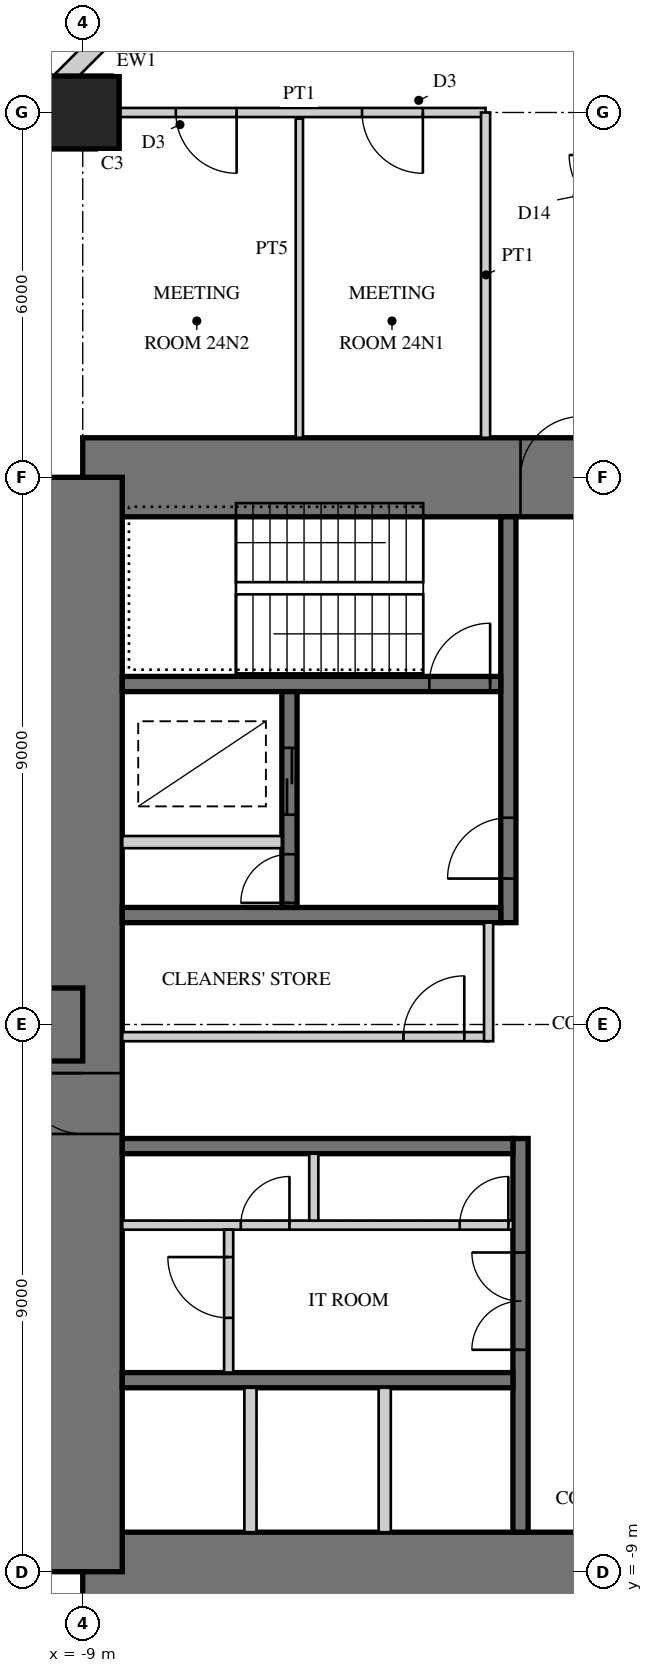
"""IFC4 building model, lengths in metres.
Left out: names, types, materials, properties, quantities, classifications, styles, units other than length and angle.
Written with IfcOpenShell. Run it as: python <this file> out.ifc"""

import sys

from ifc_helpers import new_model, si_unit, direction, frame, frame_2d, origin, origin_2d, place, context, subcontext, project, spatial, rectangle, extrude, element, fill, save


model = new_model("IFC4")
c1 = context("Model", 3, precision=1e-05, world=origin(), true_north=direction((0.0, 1.0)))
c2 = subcontext(c1, "Body", "Model", "MODEL_VIEW")
j1 = project(units=[si_unit("LENGTHUNIT", "METRE"), si_unit("PLANEANGLEUNIT", "RADIAN")], contexts=[c1])
p1 = place(None, origin())
s1 = spatial("IfcSite", under=j1, at=p1, CompositionType="ELEMENT")
p2 = place(p1, origin())
s2 = spatial("IfcBuilding", under=s1, at=p2, CompositionType="ELEMENT")
p3 = place(p2, frame((0.0, 0.0, 100.5)))
s3 = spatial("IfcBuildingStorey", under=s2, at=p3, CompositionType="ELEMENT", Elevation=100.5)
p4 = place(p3, frame((9.0, 9.0, 0.0), z_axis=(0.0, 0.0, 1.0), x_axis=(-1.0, 0.0, 0.0)))
e1 = element("IfcWall", 1, at=p4, inside=s3, PredefinedType="SHEAR", context=c2, shape_type="SweptSolid", body=[
    extrude(rectangle(XDim=18.0, YDim=1.3, at=frame_2d((9.0, 0.0))), origin(), (0.0, 0.0, 1.0), 4.0),
])
p5 = place(p4, frame((9.8, 0.0, 0.0)))
e2 = element("IfcOpeningElement", 2, at=p5, cuts=e1, PredefinedType="OPENING", context=c2, shape_type="SweptSolid", body=[
    extrude(rectangle(XDim=1.0, YDim=2.4, at=frame_2d((0.5, 1.2))), frame((0.0, 0.66, 0.0), z_axis=(0.0, -1.0, 0.0), x_axis=(1.0, 0.0, 0.0)), (0.0, 0.0, 1.0), 1.32),
])
p6 = place(p3, frame((-9.0, -9.0, 0.0), z_axis=(0.0, 0.0, 1.0), x_axis=(1.0, 0.0, 0.0)))
e3 = element("IfcWall", 3, at=p6, inside=s3, PredefinedType="SHEAR", context=c2, shape_type="SweptSolid", body=[
    extrude(rectangle(XDim=18.0, YDim=1.3, at=frame_2d((9.0, 0.0))), origin(), (0.0, 0.0, 1.0), 4.0),
])
p7 = place(p6, frame((9.8, 0.0, 0.0)))
e4 = element("IfcOpeningElement", 4, at=p7, cuts=e3, PredefinedType="OPENING", context=c2, shape_type="SweptSolid", body=[
    extrude(rectangle(XDim=1.0, YDim=2.4, at=frame_2d((0.5, 1.2))), frame((0.0, 0.66, 0.0), z_axis=(0.0, -1.0, 0.0), x_axis=(1.0, 0.0, 0.0)), (0.0, 0.0, 1.0), 1.32),
])
p8 = place(p3, frame((-9.0, 9.0, 0.0), z_axis=(0.0, 0.0, 1.0), x_axis=(0.0, -1.0, 0.0)))
e5 = element("IfcWall", 5, at=p8, inside=s3, PredefinedType="SHEAR", context=c2, shape_type="SweptSolid", body=[
    extrude(rectangle(XDim=18.0, YDim=1.3, at=frame_2d((9.0, 0.0))), origin(), (0.0, 0.0, 1.0), 4.0),
])
p9 = place(p8, frame((9.8, 0.0, 0.0)))
e6 = element("IfcOpeningElement", 6, at=p9, cuts=e5, PredefinedType="OPENING", context=c2, shape_type="SweptSolid", body=[
    extrude(rectangle(XDim=1.0, YDim=2.4, at=frame_2d((0.5, 1.2))), frame((0.0, 0.66, 0.0), z_axis=(0.0, -1.0, 0.0), x_axis=(1.0, 0.0, 0.0)), (0.0, 0.0, 1.0), 1.32),
])
p10 = place(p3, frame((-2.0, 1.675, 0.0), z_axis=(0.0, 0.0, 1.0), x_axis=(0.0, 1.0, 0.0)))
e7 = element("IfcWall", 7, at=p10, inside=s3, PredefinedType="SHEAR", context=c2, shape_type="SweptSolid", body=[
    extrude(rectangle(XDim=6.675, YDim=0.25, at=frame_2d((3.337, 0.0))), origin(), (0.0, 0.0, 1.0), 4.0),
])
p11 = place(p10, frame((0.725, 0.0, 0.0)))
e8 = element("IfcOpeningElement", 8, at=p11, cuts=e7, PredefinedType="OPENING", context=c2, shape_type="SweptSolid", body=[
    extrude(rectangle(XDim=1.0, YDim=2.1, at=frame_2d((0.5, 1.05))), frame((0.0, 0.135, 0.0), z_axis=(0.0, -1.0, 0.0), x_axis=(1.0, 0.0, 0.0)), (0.0, 0.0, 1.0), 0.27),
])
p12 = place(p3, frame((-2.125, 1.8, 0.0), z_axis=(0.0, 0.0, 1.0), x_axis=(-1.0, 0.0, 0.0)))
e9 = element("IfcWall", 9, at=p12, inside=s3, PredefinedType="SHEAR", context=c2, shape_type="SweptSolid", body=[
    extrude(rectangle(XDim=6.225, YDim=0.25, at=frame_2d((3.113, 0.0))), origin(), (0.0, 0.0, 1.0), 4.0),
])
p13 = place(p3, frame((-2.125, 5.6, 0.0), z_axis=(0.0, 0.0, 1.0), x_axis=(-1.0, 0.0, 0.0)))
e10 = element("IfcWall", 10, at=p13, inside=s3, PredefinedType="SHEAR", context=c2, shape_type="SweptSolid", body=[
    extrude(rectangle(XDim=6.225, YDim=0.25, at=frame_2d((3.113, 0.0))), origin(), (0.0, 0.0, 1.0), 4.0),
])
p14 = place(p13, frame((0.175, 0.0, 0.0)))
e11 = element("IfcOpeningElement", 11, at=p14, cuts=e10, PredefinedType="OPENING", context=c2, shape_type="SweptSolid", body=[
    extrude(rectangle(XDim=1.0, YDim=2.1, at=frame_2d((0.5, 1.05))), frame((0.0, 0.135, 0.0), z_axis=(0.0, -1.0, 0.0), x_axis=(1.0, 0.0, 0.0)), (0.0, 0.0, 1.0), 0.27),
])
p15 = place(p3, frame((-5.6, 1.925, 0.0), z_axis=(0.0, 0.0, 1.0), x_axis=(0.0, 1.0, 0.0)))
e12 = element("IfcWall", 12, at=p15, inside=s3, PredefinedType="SHEAR", context=c2, shape_type="SweptSolid", body=[
    extrude(rectangle(XDim=3.55, YDim=0.25, at=frame_2d((1.775, 0.0))), origin(), (0.0, 0.0, 1.0), 4.0),
])
p16 = place(p15, frame((1.525, 0.0, 0.0)))
e13 = element("IfcOpeningElement", 13, at=p16, cuts=e12, PredefinedType="OPENING", context=c2, shape_type="SweptSolid", body=[
    extrude(rectangle(XDim=1.1, YDim=2.2, at=frame_2d((0.55, 1.1))), frame((0.0, 0.135, 0.0), z_axis=(0.0, -1.0, 0.0), x_axis=(1.0, 0.0, 0.0)), (0.0, 0.0, 1.0), 0.27),
])
p17 = place(p15, frame((0.075, 0.0, 0.0)))
e14 = element("IfcOpeningElement", 14, at=p17, cuts=e12, PredefinedType="OPENING", context=c2, shape_type="SweptSolid", body=[
    extrude(rectangle(XDim=0.8, YDim=2.1, at=frame_2d((0.4, 1.05))), frame((0.0, 0.135, 0.0), z_axis=(0.0, -1.0, 0.0), x_axis=(1.0, 0.0, 0.0)), (0.0, 0.0, 1.0), 0.27),
])
p18 = place(p3, frame((-5.725, 3.0, 0.0), z_axis=(0.0, 0.0, 1.0), x_axis=(-1.0, 0.0, 0.0)))
e15 = element("IfcWall", 15, at=p18, inside=s3, PredefinedType="PARTITIONING", context=c2, shape_type="SweptSolid", body=[
    extrude(rectangle(XDim=2.625, YDim=0.2, at=frame_2d((1.312, 0.0))), origin(), (0.0, 0.0, 1.0), 4.0),
])
p19 = place(p3, frame((-1.8, -1.875, 0.0), z_axis=(0.0, 0.0, 1.0), x_axis=(0.0, -1.0, 0.0)))
e16 = element("IfcWall", 16, at=p19, inside=s3, PredefinedType="SHEAR", context=c2, shape_type="SweptSolid", body=[
    extrude(rectangle(XDim=6.475, YDim=0.25, at=frame_2d((3.238, 0.0))), origin(), (0.0, 0.0, 1.0), 4.0),
])
p20 = place(p19, frame((1.875, 0.0, 0.0)))
e17 = element("IfcOpeningElement", 17, at=p20, cuts=e16, PredefinedType="OPENING", context=c2, shape_type="SweptSolid", body=[
    extrude(rectangle(XDim=1.6, YDim=2.4, at=frame_2d((0.8, 1.2))), frame((0.0, 0.135, 0.0), z_axis=(0.0, -1.0, 0.0), x_axis=(1.0, 0.0, 0.0)), (0.0, 0.0, 1.0), 0.27),
])
for number, where, z_axis, x_axis in (
    (18, (-1.925, -2.0, 0.0), (0.0, 0.0, 1.0), (-1.0, 0.0, 0.0)),
    (19, (-1.925, -5.85, 0.0), (0.0, 0.0, 1.0), (-1.0, 0.0, 0.0)),
):
    element("IfcWall", number, at=place(p3, frame(where, z_axis=z_axis, x_axis=x_axis)), inside=s3, PredefinedType="SHEAR", context=c2, shape_type="SweptSolid", body=[
        extrude(rectangle(XDim=6.425, YDim=0.25, at=frame_2d((3.212, 0.0))), origin(), (0.0, 0.0, 1.0), 4.0),
    ])
p21 = place(p3, frame((-1.925, -3.3, 0.0), z_axis=(0.0, 0.0, 1.0), x_axis=(-1.0, 0.0, 0.0)))
e20 = element("IfcWall", 20, at=p21, inside=s3, PredefinedType="PARTITIONING", context=c2, shape_type="SweptSolid", body=[
    extrude(rectangle(XDim=6.425, YDim=0.15, at=frame_2d((3.212, 0.0))), origin(), (0.0, 0.0, 1.0), 4.0),
])
p22 = place(p21, frame((0.075, 0.0, 0.0)))
e21 = element("IfcOpeningElement", 21, at=p22, cuts=e20, PredefinedType="OPENING", context=c2, shape_type="SweptSolid", body=[
    extrude(rectangle(XDim=0.8, YDim=2.1, at=frame_2d((0.4, 1.05))), frame((0.0, 0.085, 0.0), z_axis=(0.0, -1.0, 0.0), x_axis=(1.0, 0.0, 0.0)), (0.0, 0.0, 1.0), 0.17),
])
p23 = place(p21, frame((3.675, 0.0, 0.0)))
e22 = element("IfcOpeningElement", 22, at=p23, cuts=e20, PredefinedType="OPENING", context=c2, shape_type="SweptSolid", body=[
    extrude(rectangle(XDim=0.8, YDim=2.1, at=frame_2d((0.4, 1.05))), frame((0.0, 0.085, 0.0), z_axis=(0.0, -1.0, 0.0), x_axis=(1.0, 0.0, 0.0)), (0.0, 0.0, 1.0), 0.17),
])
p24 = place(p3, frame((-5.2, -2.125, 0.0), z_axis=(0.0, 0.0, 1.0), x_axis=(0.0, -1.0, 0.0)))
e23 = element("IfcWall", 23, at=p24, inside=s3, PredefinedType="PARTITIONING", context=c2, shape_type="SweptSolid", body=[
    extrude(rectangle(XDim=1.1, YDim=0.15, at=frame_2d((0.55, 0.0))), origin(), (0.0, 0.0, 1.0), 4.0),
])
for number, where, z_axis, x_axis in (
    (24, (-4.033, -5.975, 0.0), (0.0, 0.0, 1.0), (0.0, -1.0, 0.0)),
    (25, (-6.242, -5.975, 0.0), (0.0, 0.0, 1.0), (0.0, -1.0, 0.0)),
):
    element("IfcWall", number, at=place(p3, frame(where, z_axis=z_axis, x_axis=x_axis)), inside=s3, PredefinedType="PARTITIONING", context=c2, shape_type="SweptSolid", body=[
        extrude(rectangle(XDim=2.375, YDim=0.2, at=frame_2d((1.188, 0.0))), origin(), (0.0, 0.0, 1.0), 4.0),
    ])
p25 = place(p3, frame((-9.0, 0.0, 0.0), z_axis=(0.0, 0.0, 1.0), x_axis=(-1.0, 0.0, 0.0)))
e26 = element("IfcWall", 26, at=p25, inside=s3, PredefinedType="SHEAR", context=c2, shape_type="SweptSolid", body=[
    extrude(rectangle(XDim=18.0, YDim=1.2, at=frame_2d((9.0, 0.0))), origin(), (0.0, 0.0, 1.0), 4.0),
])
p26 = place(p25, frame((9.8, 0.0, 0.0)))
e27 = element("IfcOpeningElement", 27, at=p26, cuts=e26, PredefinedType="OPENING", context=c2, shape_type="SweptSolid", body=[
    extrude(rectangle(XDim=1.0, YDim=2.2, at=frame_2d((0.5, 1.1))), frame((0.0, 0.61, 0.0), z_axis=(0.0, -1.0, 0.0), x_axis=(1.0, 0.0, 0.0)), (0.0, 0.0, 1.0), 1.22),
])
p27 = place(p3, frame((-9.0, 15.0, 0.0), z_axis=(0.0, 0.0, 1.0), x_axis=(1.0, 0.0, 0.0)))
e28 = element("IfcColumn", 28, at=p27, inside=s3, PredefinedType="COLUMN", context=c2, shape_type="SweptSolid", body=[
    extrude(rectangle(XDim=1.2, YDim=1.2, at=origin_2d()), origin(), (0.0, 0.0, 1.0), 4.0),
])
p28 = place(p3, frame((-6.277, 18.6, 0.0), z_axis=(0.0, 0.0, 1.0), x_axis=(-0.707106781187, -0.707106781187, 0.0)))
e29 = element("IfcWall", 29, at=p28, inside=s3, PredefinedType="SOLIDWALL", context=c2, shape_type="SweptSolid", body=[
    extrude(rectangle(XDim=4.728, YDim=0.3, at=frame_2d((2.364, 0.0))), origin(), (0.0, 0.0, 1.0), 3.8),
])
p29 = place(p28, frame((1.65, 0.0, 0.0)))
e30 = element("IfcOpeningElement", 30, at=p29, cuts=e29, PredefinedType="OPENING", context=c2, shape_type="SweptSolid", body=[
    extrude(rectangle(XDim=1.0, YDim=2.4, at=frame_2d((0.5, 1.2))), frame((0.0, 0.16, 0.0), z_axis=(0.0, -1.0, 0.0), x_axis=(1.0, 0.0, 0.0)), (0.0, 0.0, 1.0), 0.32),
])
p30 = place(p3, frame((-2.325, -0.2, 0.0), z_axis=(0.0, 0.0, 1.0), x_axis=(-1.0, 0.0, 0.0)))
e31 = element("IfcWall", 31, at=p30, inside=s3, PredefinedType="PARTITIONING", context=c2, shape_type="SweptSolid", body=[
    extrude(rectangle(XDim=6.025, YDim=0.15, at=frame_2d((3.013, 0.0))), origin(), (0.0, 0.0, 1.0), 3.8),
])
p31 = place(p30, frame((0.4, 0.0, 0.0)))
e32 = element("IfcOpeningElement", 32, at=p31, cuts=e31, PredefinedType="OPENING", context=c2, shape_type="SweptSolid", body=[
    extrude(rectangle(XDim=1.0, YDim=2.1, at=frame_2d((0.5, 1.05))), frame((0.0, 0.085, 0.0), z_axis=(0.0, -1.0, 0.0), x_axis=(1.0, 0.0, 0.0)), (0.0, 0.0, 1.0), 0.17),
])
p32 = place(p3, frame((-2.325, 1.675, 0.0), z_axis=(0.0, 0.0, 1.0), x_axis=(0.0, -1.0, 0.0)))
e33 = element("IfcWall", 33, at=p32, inside=s3, PredefinedType="PARTITIONING", context=c2, shape_type="SweptSolid", body=[
    extrude(rectangle(XDim=1.95, YDim=0.15, at=frame_2d((0.975, 0.0))), origin(), (0.0, 0.0, 1.0), 3.8),
])
p33 = place(p3, frame((-6.6, -3.375, 0.0), z_axis=(0.0, 0.0, 1.0), x_axis=(0.0, -1.0, 0.0)))
e34 = element("IfcWall", 34, at=p33, inside=s3, PredefinedType="PARTITIONING", context=c2, shape_type="SweptSolid", body=[
    extrude(rectangle(XDim=2.35, YDim=0.15, at=frame_2d((1.175, 0.0))), origin(), (0.0, 0.0, 1.0), 3.8),
])
p34 = place(p33, frame((0.45, 0.0, 0.0)))
e35 = element("IfcOpeningElement", 35, at=p34, cuts=e34, PredefinedType="OPENING", context=c2, shape_type="SweptSolid", body=[
    extrude(rectangle(XDim=1.0, YDim=2.1, at=frame_2d((0.5, 1.05))), frame((0.0, 0.085, 0.0), z_axis=(0.0, -1.0, 0.0), x_axis=(1.0, 0.0, 0.0)), (0.0, 0.0, 1.0), 0.17),
])
p35 = place(p3, frame((-2.375, 15.0, 0.0), z_axis=(0.0, 0.0, 1.0), x_axis=(-1.0, 0.0, 0.0)))
e36 = element("IfcWall", 36, at=p35, inside=s3, PredefinedType="PARTITIONING", context=c2, shape_type="SweptSolid", body=[
    extrude(rectangle(XDim=6.125, YDim=0.15, at=frame_2d((3.062, 0.0))), origin(), (0.0, 0.0, 1.0), 3.0),
])
p36 = place(p35, frame((1.031, 0.0, 0.0)))
e37 = element("IfcOpeningElement", 37, at=p36, cuts=e36, PredefinedType="OPENING", context=c2, shape_type="SweptSolid", body=[
    extrude(rectangle(XDim=1.0, YDim=2.1, at=frame_2d((0.5, 1.05))), frame((0.0, 0.085, 0.0), z_axis=(0.0, -1.0, 0.0), x_axis=(1.0, 0.0, 0.0)), (0.0, 0.0, 1.0), 0.17),
])
p37 = place(p35, frame((4.094, 0.0, 0.0)))
e38 = element("IfcOpeningElement", 38, at=p37, cuts=e36, PredefinedType="OPENING", context=c2, shape_type="SweptSolid", body=[
    extrude(rectangle(XDim=1.0, YDim=2.1, at=frame_2d((0.5, 1.05))), frame((0.0, 0.085, 0.0), z_axis=(0.0, -1.0, 0.0), x_axis=(1.0, 0.0, 0.0)), (0.0, 0.0, 1.0), 0.17),
])
p38 = place(p3, frame((-2.375, 9.65, 0.0), z_axis=(0.0, 0.0, 1.0), x_axis=(0.0, 1.0, 0.0)))
e39 = element("IfcWall", 39, at=p38, inside=s3, PredefinedType="PARTITIONING", context=c2, shape_type="SweptSolid", body=[
    extrude(rectangle(XDim=5.35, YDim=0.15, at=frame_2d((2.675, 0.0))), origin(), (0.0, 0.0, 1.0), 3.8),
])
p39 = place(p3, frame((-5.438, 9.65, 0.0), z_axis=(0.0, 0.0, 1.0), x_axis=(0.0, 1.0, 0.0)))
e40 = element("IfcWall", 40, at=p39, inside=s3, PredefinedType="PLUMBINGWALL", context=c2, shape_type="SweptSolid", body=[
    extrude(rectangle(XDim=5.25, YDim=0.12, at=frame_2d((2.625, 0.0))), origin(), (0.0, 0.0, 1.0), 3.8),
])
p40 = place(p31, frame((1.0, 0.0, 0.0), z_axis=(0.0, 0.0, 1.0), x_axis=(-1.0, 0.0, 0.0)))
e41 = element("IfcDoor", 41, at=p40, inside=s3, OperationType="SINGLE_SWING_RIGHT", PredefinedType="DOOR", context=c2, shape_type="SweptSolid", body=[
    extrude(rectangle(XDim=1.0, YDim=2.1, at=frame_2d((0.5, 1.05))), frame((0.0, 0.025, 0.0), z_axis=(0.0, -1.0, 0.0), x_axis=(1.0, 0.0, 0.0)), (0.0, 0.0, 1.0), 0.05),
])
fill(e32, e41)
p41 = place(p34, frame((1.0, 0.0, 0.0), z_axis=(0.0, 0.0, 1.0), x_axis=(-1.0, 0.0, 0.0)))
e42 = element("IfcDoor", 42, at=p41, inside=s3, OperationType="SINGLE_SWING_RIGHT", PredefinedType="DOOR", context=c2, shape_type="SweptSolid", body=[
    extrude(rectangle(XDim=1.0, YDim=2.1, at=frame_2d((0.5, 1.05))), frame((0.0, 0.025, 0.0), z_axis=(0.0, -1.0, 0.0), x_axis=(1.0, 0.0, 0.0)), (0.0, 0.0, 1.0), 0.05),
])
fill(e35, e42)
p42 = place(p36, origin())
e43 = element("IfcDoor", 43, at=p42, inside=s3, OperationType="SINGLE_SWING_LEFT", PredefinedType="DOOR", context=c2, shape_type="SweptSolid", body=[
    extrude(rectangle(XDim=1.0, YDim=2.1, at=frame_2d((0.5, 1.05))), frame((0.0, 0.025, 0.0), z_axis=(0.0, -1.0, 0.0), x_axis=(1.0, 0.0, 0.0)), (0.0, 0.0, 1.0), 0.05),
])
fill(e37, e43)
p43 = place(p37, origin())
e44 = element("IfcDoor", 44, at=p43, inside=s3, OperationType="SINGLE_SWING_LEFT", PredefinedType="DOOR", context=c2, shape_type="SweptSolid", body=[
    extrude(rectangle(XDim=1.0, YDim=2.1, at=frame_2d((0.5, 1.05))), frame((0.0, 0.025, 0.0), z_axis=(0.0, -1.0, 0.0), x_axis=(1.0, 0.0, 0.0)), (0.0, 0.0, 1.0), 0.05),
])
fill(e38, e44)
p44 = place(p5, frame((1.0, 0.0, 0.0), z_axis=(0.0, 0.0, 1.0), x_axis=(-1.0, 0.0, 0.0)))
e45 = element("IfcDoor", 45, at=p44, inside=s3, OperationType="SINGLE_SWING_RIGHT", PredefinedType="DOOR", context=c2, shape_type="SweptSolid", body=[
    extrude(rectangle(XDim=1.0, YDim=2.4, at=frame_2d((0.5, 1.2))), frame((0.0, -0.005, 0.0), z_axis=(0.0, -1.0, 0.0), x_axis=(1.0, 0.0, 0.0)), (0.0, 0.0, 1.0), 0.05),
])
fill(e2, e45)
p45 = place(p9, frame((1.0, 0.0, 0.0), z_axis=(0.0, 0.0, 1.0), x_axis=(-1.0, 0.0, 0.0)))
e46 = element("IfcDoor", 46, at=p45, inside=s3, OperationType="SINGLE_SWING_RIGHT", PredefinedType="DOOR", context=c2, shape_type="SweptSolid", body=[
    extrude(rectangle(XDim=1.0, YDim=2.4, at=frame_2d((0.5, 1.2))), frame((0.0, -0.005, 0.0), z_axis=(0.0, -1.0, 0.0), x_axis=(1.0, 0.0, 0.0)), (0.0, 0.0, 1.0), 0.05),
])
fill(e6, e46)
p46 = place(p11, origin())
e47 = element("IfcDoor", 47, at=p46, inside=s3, OperationType="SINGLE_SWING_LEFT", PredefinedType="DOOR", context=c2, shape_type="SweptSolid", body=[
    extrude(rectangle(XDim=1.0, YDim=2.1, at=frame_2d((0.5, 1.05))), frame((0.0, 0.025, 0.0), z_axis=(0.0, -1.0, 0.0), x_axis=(1.0, 0.0, 0.0)), (0.0, 0.0, 1.0), 0.05),
])
fill(e8, e47)
p47 = place(p14, frame((1.0, 0.0, 0.0), z_axis=(0.0, 0.0, 1.0), x_axis=(-1.0, 0.0, 0.0)))
e48 = element("IfcDoor", 48, at=p47, inside=s3, OperationType="SINGLE_SWING_RIGHT", PredefinedType="DOOR", context=c2, shape_type="SweptSolid", body=[
    extrude(rectangle(XDim=1.0, YDim=2.1, at=frame_2d((0.5, 1.05))), frame((0.0, 0.025, 0.0), z_axis=(0.0, -1.0, 0.0), x_axis=(1.0, 0.0, 0.0)), (0.0, 0.0, 1.0), 0.05),
])
fill(e11, e48)
p48 = place(p16, origin())
e49 = element("IfcDoor", 49, at=p48, inside=s3, OperationType="DOUBLE_DOOR_SLIDING", PredefinedType="DOOR", context=c2, shape_type="SweptSolid", body=[
    extrude(rectangle(XDim=1.1, YDim=2.2, at=frame_2d((0.55, 1.1))), frame((0.0, 0.025, 0.0), z_axis=(0.0, -1.0, 0.0), x_axis=(1.0, 0.0, 0.0)), (0.0, 0.0, 1.0), 0.05),
])
fill(e13, e49)
p49 = place(p17, origin())
e50 = element("IfcDoor", 50, at=p49, inside=s3, OperationType="SINGLE_SWING_LEFT", PredefinedType="DOOR", context=c2, shape_type="SweptSolid", body=[
    extrude(rectangle(XDim=0.8, YDim=2.1, at=frame_2d((0.4, 1.05))), frame((0.0, 0.025, 0.0), z_axis=(0.0, -1.0, 0.0), x_axis=(1.0, 0.0, 0.0)), (0.0, 0.0, 1.0), 0.05),
])
fill(e14, e50)
p50 = place(p20, frame((1.6, 0.0, 0.0), z_axis=(0.0, 0.0, 1.0), x_axis=(-1.0, 0.0, 0.0)))
e51 = element("IfcDoor", 51, at=p50, inside=s3, OperationType="DOUBLE_DOOR_SINGLE_SWING", PredefinedType="DOOR", context=c2, shape_type="SweptSolid", body=[
    extrude(rectangle(XDim=1.6, YDim=2.4, at=frame_2d((0.8, 1.2))), frame((0.0, 0.025, 0.0), z_axis=(0.0, -1.0, 0.0), x_axis=(1.0, 0.0, 0.0)), (0.0, 0.0, 1.0), 0.05),
])
fill(e17, e51)
p51 = place(p22, frame((0.8, 0.0, 0.0), z_axis=(0.0, 0.0, 1.0), x_axis=(-1.0, 0.0, 0.0)))
e52 = element("IfcDoor", 52, at=p51, inside=s3, OperationType="SINGLE_SWING_RIGHT", PredefinedType="DOOR", context=c2, shape_type="SweptSolid", body=[
    extrude(rectangle(XDim=0.8, YDim=2.1, at=frame_2d((0.4, 1.05))), frame((0.0, 0.025, 0.0), z_axis=(0.0, -1.0, 0.0), x_axis=(1.0, 0.0, 0.0)), (0.0, 0.0, 1.0), 0.05),
])
fill(e21, e52)
p52 = place(p23, frame((0.8, 0.0, 0.0), z_axis=(0.0, 0.0, 1.0), x_axis=(-1.0, 0.0, 0.0)))
e53 = element("IfcDoor", 53, at=p52, inside=s3, OperationType="SINGLE_SWING_RIGHT", PredefinedType="DOOR", context=c2, shape_type="SweptSolid", body=[
    extrude(rectangle(XDim=0.8, YDim=2.1, at=frame_2d((0.4, 1.05))), frame((0.0, 0.025, 0.0), z_axis=(0.0, -1.0, 0.0), x_axis=(1.0, 0.0, 0.0)), (0.0, 0.0, 1.0), 0.05),
])
fill(e22, e53)
save(model, sys.argv[1])
